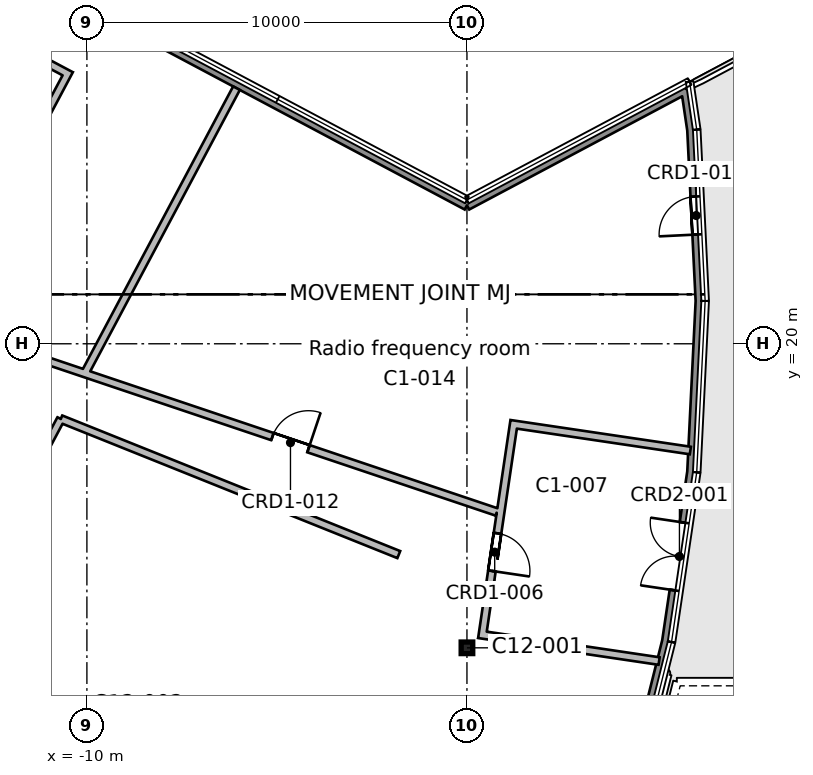
"""IFC4 building model, lengths in metres.
Left out: names, types, materials, properties, quantities, classifications, styles, units other than length and angle.
Written with IfcOpenShell. Run it as: python <this file> out.ifc"""

import sys

from ifc_helpers import new_model, si_unit, direction, frame, frame_2d, origin, origin_2d, place, context, subcontext, project, spatial, rectangle, hollow_rectangle, extrude, element, fill, save


model = new_model("IFC4")
c1 = context("Model", 3, precision=1e-05, world=origin(), true_north=direction((0.0, 1.0)))
c2 = subcontext(c1, "Body", "Model", "MODEL_VIEW")
j1 = project(units=[si_unit("LENGTHUNIT", "METRE"), si_unit("PLANEANGLEUNIT", "RADIAN")], contexts=[c1])
p1 = place(None, origin())
s1 = spatial("IfcSite", under=j1, at=p1, CompositionType="ELEMENT")
p2 = place(p1, origin())
s2 = spatial("IfcBuilding", under=s1, at=p2, CompositionType="ELEMENT")
p3 = place(p2, frame((0.0, 0.0, 328.2)))
s3 = spatial("IfcBuildingStorey", under=s2, at=p3, CompositionType="ELEMENT", Elevation=328.2)
p4 = place(p3, frame((0.0, 12.0, 0.0), z_axis=(0.0, 0.0, 1.0), x_axis=(1.0, 0.0, 0.0)))
e1 = element("IfcColumn", 1, at=p4, inside=s3, PredefinedType="COLUMN", context=c2, shape_type="SweptSolid", body=[
    extrude(hollow_rectangle(XDim=0.305, YDim=0.305, WallThickness=0.009, InnerFilletRadius=0.004, OuterFilletRadius=0.013, at=origin_2d()), origin(), (0.0, 0.0, 1.0), 4.2),
])
p5 = place(p3, frame((-29.918, 39.55, 0.0), z_axis=(0.0, 0.0, 1.0), x_axis=(0.882946997297, -0.469472682872, 0.0)))
e2 = element("IfcWall", 2, at=p5, inside=s3, PredefinedType="STANDARD", context=c2, shape_type="SweptSolid", body=[
    extrude(rectangle(XDim=33.884, YDim=0.25, at=frame_2d((16.942, 0.0))), origin(), (0.0, 0.0, 1.0), 3.8),
])
p6 = place(p3, frame((0.0, 23.642, 0.0), z_axis=(0.0, 0.0, 1.0), x_axis=(0.882950939347, 0.469465268903, 0.0)))
e3 = element("IfcWall", 3, at=p6, inside=s3, PredefinedType="STANDARD", context=c2, shape_type="SweptSolid", body=[
    extrude(rectangle(XDim=6.524, YDim=0.25, at=frame_2d((3.262, 0.0))), origin(), (0.0, 0.0, 1.0), 3.8),
])
p7 = place(p3, frame((5.761, 26.705, 0.0), z_axis=(0.0, 0.0, 1.0), x_axis=(0.146791207587, -0.98916749915, 0.0)))
e4 = element("IfcWall", 4, at=p7, inside=s3, PredefinedType="STANDARD", context=c2, shape_type="SweptSolid", body=[
    extrude(rectangle(XDim=1.094, YDim=0.25, at=frame_2d((0.547, 0.0))), origin(), (0.0, 0.0, 1.0), 3.8),
])
p8 = place(p3, frame((5.921, 25.623, 0.0), z_axis=(0.0, 0.0, 1.0), x_axis=(0.049023404148, -0.998797630076, 0.0)))
e5 = element("IfcWall", 5, at=p8, inside=s3, PredefinedType="STANDARD", context=c2, shape_type="SweptSolid", body=[
    extrude(rectangle(XDim=4.502, YDim=0.25, at=frame_2d((2.251, 0.0))), origin(), (0.0, 0.0, 1.0), 3.8),
])
p9 = place(p8, frame((1.751, 0.0, 0.0)))
e6 = element("IfcOpeningElement", 6, at=p9, cuts=e5, PredefinedType="OPENING", context=c2, shape_type="SweptSolid", body=[
    extrude(rectangle(XDim=1.0, YDim=2.1, at=frame_2d((0.5, 1.05))), frame((0.0, 0.135, 0.0), z_axis=(0.0, -1.0, 0.0), x_axis=(1.0, 0.0, 0.0)), (0.0, 0.0, 1.0), 0.27),
])
p10 = place(p3, frame((6.142, 21.126, 0.0), z_axis=(0.0, 0.0, 1.0), x_axis=(-0.049023404148, -0.998797630076, 0.0)))
e7 = element("IfcWall", 7, at=p10, inside=s3, PredefinedType="STANDARD", context=c2, shape_type="SweptSolid", body=[
    extrude(rectangle(XDim=4.502, YDim=0.25, at=frame_2d((2.251, 0.0))), origin(), (0.0, 0.0, 1.0), 3.8),
])
p11 = place(p3, frame((5.921, 16.63, 0.0), z_axis=(0.0, 0.0, 1.0), x_axis=(-0.146749130858, -0.989173742369, 0.0)))
e8 = element("IfcWall", 8, at=p11, inside=s3, PredefinedType="STANDARD", context=c2, shape_type="SweptSolid", body=[
    extrude(rectangle(XDim=4.502, YDim=0.25, at=frame_2d((2.251, 0.0))), origin(), (0.0, 0.0, 1.0), 3.8),
])
p12 = place(p11, frame((1.351, 0.0, 0.0)))
e9 = element("IfcOpeningElement", 9, at=p12, cuts=e8, PredefinedType="OPENING", context=c2, shape_type="SweptSolid", body=[
    extrude(rectangle(XDim=1.8, YDim=2.4, at=frame_2d((0.9, 1.2))), frame((0.0, 0.135, 0.0), z_axis=(0.0, -1.0, 0.0), x_axis=(1.0, 0.0, 0.0)), (0.0, 0.0, 1.0), 0.27),
])
p13 = place(p3, frame((5.261, 12.177, 0.0), z_axis=(0.0, 0.0, 1.0), x_axis=(-0.242956693097, -0.970037136031, 0.0)))
e10 = element("IfcWall", 10, at=p13, inside=s3, PredefinedType="STANDARD", context=c2, shape_type="SweptSolid", body=[
    extrude(rectangle(XDim=4.502, YDim=0.25, at=frame_2d((2.251, 0.0))), origin(), (0.0, 0.0, 1.0), 3.8),
])
p14 = place(p3, frame((-10.417, 27.057, 0.0), z_axis=(0.0, 0.0, 1.0), x_axis=(-0.882947150019, 0.469472395646, 0.0)))
e11 = element("IfcWall", 11, at=p14, inside=s3, PredefinedType="PARTITIONING", context=c2, shape_type="SweptSolid", body=[
    extrude(rectangle(XDim=14.2, YDim=0.2, at=frame_2d((7.1, 0.0))), origin(), (0.0, 0.0, 1.0), 3.8),
])
p15 = place(p3, frame((-10.552, 27.016, 0.0), z_axis=(0.0, 0.0, 1.0), x_axis=(-0.469462324734, -0.882952504756, 0.0)))
e12 = element("IfcWall", 12, at=p15, inside=s3, PredefinedType="PARTITIONING", context=c2, shape_type="SweptSolid", body=[
    extrude(rectangle(XDim=6.8, YDim=0.2, at=frame_2d((3.4, 0.0))), origin(), (0.0, 0.0, 1.0), 3.8),
])
p16 = place(p3, frame((5.878, 17.191, 0.0), z_axis=(0.0, 0.0, 1.0), x_axis=(-0.989175316106, 0.146738522571, 0.0)))
e13 = element("IfcWall", 13, at=p16, inside=s3, PredefinedType="PARTITIONING", context=c2, shape_type="SweptSolid", body=[
    extrude(rectangle(XDim=4.8, YDim=0.2, at=frame_2d((2.4, 0.0))), origin(), (0.0, 0.0, 1.0), 3.8),
])
p17 = place(p3, frame((5.056, 11.652, 0.0), z_axis=(0.0, 0.0, 1.0), x_axis=(-0.989174220841, 0.146745905647, 0.0)))
e14 = element("IfcWall", 14, at=p17, inside=s3, PredefinedType="PARTITIONING", context=c2, shape_type="SweptSolid", body=[
    extrude(rectangle(XDim=4.8, YDim=0.2, at=frame_2d((2.4, 0.0))), origin(), (0.0, 0.0, 1.0), 3.8),
])
p18 = place(p3, frame((1.229, 17.881, 0.0), z_axis=(0.0, 0.0, 1.0), x_axis=(-0.146698756558, -0.989181214351, 0.0)))
e15 = element("IfcWall", 15, at=p18, inside=s3, PredefinedType="PARTITIONING", context=c2, shape_type="SweptSolid", body=[
    extrude(rectangle(XDim=5.6, YDim=0.2, at=frame_2d((2.8, 0.0))), origin(), (0.0, 0.0, 1.0), 3.8),
])
p19 = place(p18, frame((2.9, 0.0, 0.0)))
e16 = element("IfcOpeningElement", 16, at=p19, cuts=e15, PredefinedType="OPENING", context=c2, shape_type="SweptSolid", body=[
    extrude(rectangle(XDim=1.0, YDim=2.1, at=frame_2d((0.5, 1.05))), frame((0.0, 0.11, 0.0), z_axis=(0.0, -1.0, 0.0), x_axis=(1.0, 0.0, 0.0)), (0.0, 0.0, 1.0), 0.22),
])
p20 = place(p3, frame((-12.072, 19.896, 0.0), z_axis=(0.0, 0.0, 1.0), x_axis=(0.94785027964, -0.318715935257, 0.0)))
e17 = element("IfcWall", 17, at=p20, inside=s3, PredefinedType="PARTITIONING", context=c2, shape_type="SweptSolid", body=[
    extrude(rectangle(XDim=2.148, YDim=0.2, at=frame_2d((1.074, 0.0))), origin(), (0.0, 0.0, 1.0), 3.8),
])
p21 = place(p3, frame((-1.793, 14.453, 0.0), z_axis=(0.0, 0.0, 1.0), x_axis=(-0.928073786127, 0.372396358071, 0.0)))
e18 = element("IfcWall", 18, at=p21, inside=s3, PredefinedType="PARTITIONING", context=c2, shape_type="SweptSolid", body=[
    extrude(rectangle(XDim=9.583, YDim=0.2, at=frame_2d((4.792, 0.0))), origin(), (0.0, 0.0, 1.0), 3.8),
])
p22 = place(p3, frame((-10.687, 18.021, 0.0), z_axis=(0.0, 0.0, 1.0), x_axis=(-0.469602315344, -0.882878058071, 0.0)))
e19 = element("IfcWall", 19, at=p22, inside=s3, PredefinedType="PARTITIONING", context=c2, shape_type="SweptSolid", body=[
    extrude(rectangle(XDim=22.794, YDim=0.2, at=frame_2d((11.397, 0.0))), origin(), (0.0, 0.0, 1.0), 3.8),
])
p23 = place(p22, frame((10.897, 0.0, 0.0)))
e20 = element("IfcOpeningElement", 20, at=p23, cuts=e19, PredefinedType="OPENING", context=c2, shape_type="SweptSolid", body=[
    extrude(rectangle(XDim=1.0, YDim=2.1, at=frame_2d((0.5, 1.05))), frame((0.0, 0.11, 0.0), z_axis=(0.0, -1.0, 0.0), x_axis=(1.0, 0.0, 0.0)), (0.0, 0.0, 1.0), 0.22),
])
p24 = place(p3, frame((-10.073, 19.224, 0.0), z_axis=(0.0, 0.0, 1.0), x_axis=(0.947842416716, -0.318739318368, 0.0)))
e21 = element("IfcWall", 21, at=p24, inside=s3, PredefinedType="PARTITIONING", context=c2, shape_type="SweptSolid", body=[
    extrude(rectangle(XDim=11.456, YDim=0.2, at=frame_2d((5.728, 0.0))), origin(), (0.0, 0.0, 1.0), 3.8),
])
p25 = place(p24, frame((5.228, 0.0, 0.0)))
e22 = element("IfcOpeningElement", 22, at=p25, cuts=e21, PredefinedType="OPENING", context=c2, shape_type="SweptSolid", body=[
    extrude(rectangle(XDim=1.0, YDim=2.1, at=frame_2d((0.5, 1.05))), frame((0.0, 0.11, 0.0), z_axis=(0.0, -1.0, 0.0), x_axis=(1.0, 0.0, 0.0)), (0.0, 0.0, 1.0), 0.22),
])
p26 = place(p3, frame((-6.064, 26.725, 0.0), z_axis=(0.0, 0.0, 1.0), x_axis=(-0.46948343028, -0.882941282698, 0.0)))
e23 = element("IfcWall", 23, at=p26, inside=s3, PredefinedType="PARTITIONING", context=c2, shape_type="SweptSolid", body=[
    extrude(rectangle(XDim=8.502, YDim=0.2, at=frame_2d((4.251, 0.0))), origin(), (0.0, 0.0, 1.0), 3.8),
])
p27 = place(p19, origin())
e24 = element("IfcDoor", 24, at=p27, inside=s3, OperationType="SINGLE_SWING_RIGHT", PredefinedType="DOOR", context=c2, shape_type="SweptSolid", body=[
    extrude(rectangle(XDim=1.0, YDim=2.1, at=frame_2d((0.5, 1.05))), frame((0.0, 0.025, 0.0), z_axis=(0.0, -1.0, 0.0), x_axis=(1.0, 0.0, 0.0)), (0.0, 0.0, 1.0), 0.05),
])
fill(e16, e24)
p28 = place(p12, frame((1.8, 0.0, 0.0), z_axis=(0.0, 0.0, 1.0), x_axis=(-1.0, 0.0, 0.0)))
e25 = element("IfcDoor", 25, at=p28, inside=s3, OperationType="DOUBLE_DOOR_SINGLE_SWING", PredefinedType="DOOR", context=c2, shape_type="SweptSolid", body=[
    extrude(rectangle(XDim=1.8, YDim=2.4, at=frame_2d((0.9, 1.2))), frame((0.0, 0.025, 0.0), z_axis=(0.0, -1.0, 0.0), x_axis=(1.0, 0.0, 0.0)), (0.0, 0.0, 1.0), 0.05),
])
fill(e9, e25)
p29 = place(p9, frame((1.0, 0.0, 0.0), z_axis=(0.0, 0.0, 1.0), x_axis=(-1.0, 0.0, 0.0)))
e26 = element("IfcDoor", 26, at=p29, inside=s3, OperationType="SINGLE_SWING_LEFT", PredefinedType="DOOR", context=c2, shape_type="SweptSolid", body=[
    extrude(rectangle(XDim=1.0, YDim=2.1, at=frame_2d((0.5, 1.05))), frame((0.0, 0.025, 0.0), z_axis=(0.0, -1.0, 0.0), x_axis=(1.0, 0.0, 0.0)), (0.0, 0.0, 1.0), 0.05),
])
fill(e6, e26)
p30 = place(p25, origin())
e27 = element("IfcDoor", 27, at=p30, inside=s3, OperationType="SINGLE_SWING_RIGHT", PredefinedType="DOOR", context=c2, shape_type="SweptSolid", body=[
    extrude(rectangle(XDim=1.0, YDim=2.1, at=frame_2d((0.5, 1.05))), frame((0.0, 0.025, 0.0), z_axis=(0.0, -1.0, 0.0), x_axis=(1.0, 0.0, 0.0)), (0.0, 0.0, 1.0), 0.05),
])
fill(e22, e27)
save(model, sys.argv[1])
